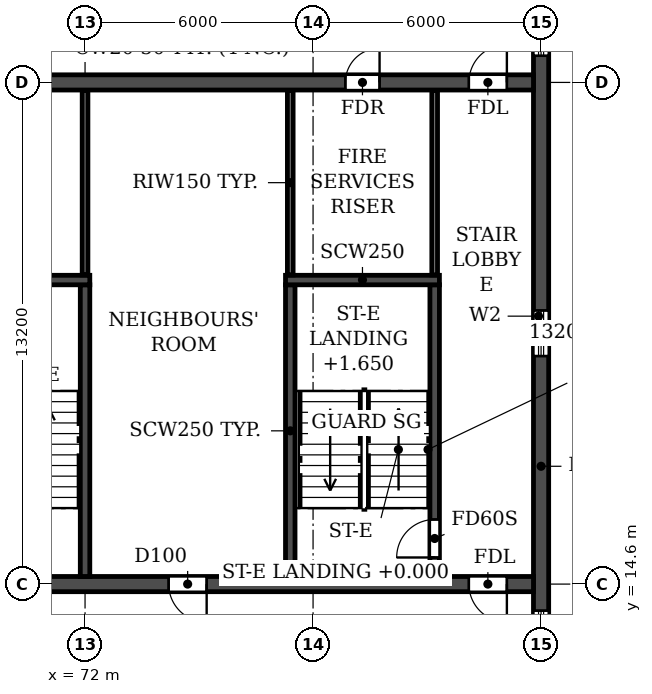
"""IFC4 building model, lengths in metres.
Left out: names, types, materials, properties, quantities, classifications, styles, units other than length and angle.
Written with IfcOpenShell. Run it as: python <this file> out.ifc"""

import sys

from ifc_helpers import new_model, si_unit, direction, frame, frame_2d, origin, place, context, subcontext, project, spatial, rectangle, extrude, element, fill, save


model = new_model("IFC4")
c1 = context("Model", 3, precision=1e-05, world=origin(), true_north=direction((0.0, 1.0)))
c2 = subcontext(c1, "Body", "Model", "MODEL_VIEW")
j1 = project(units=[si_unit("LENGTHUNIT", "METRE"), si_unit("PLANEANGLEUNIT", "RADIAN")], contexts=[c1])
p1 = place(None, origin())
s1 = spatial("IfcSite", under=j1, at=p1, CompositionType="ELEMENT")
p2 = place(p1, origin())
s2 = spatial("IfcBuilding", under=s1, at=p2, CompositionType="ELEMENT")
p3 = place(p2, frame((0.0, 0.0, 201.6)))
s3 = spatial("IfcBuildingStorey", under=s2, at=p3, CompositionType="ELEMENT", Elevation=201.6)
p4 = place(p3, frame((84.0, 4.683, 0.0), z_axis=(0.0, 0.0, 1.0), x_axis=(0.0, 1.0, 0.0)))
e1 = element("IfcWall", 1, at=p4, inside=s3, PredefinedType="SHEAR", context=c2, shape_type="SweptSolid", body=[
    extrude(rectangle(XDim=31.834, YDim=0.4, at=frame_2d((15.917, 0.0))), origin(), (0.0, 0.0, 1.0), 3.08),
])
p5 = place(p4, frame((23.817, 0.0, 0.9)))
e2 = element("IfcOpeningElement", 2, at=p5, cuts=e1, PredefinedType="OPENING", context=c2, shape_type="SweptSolid", body=[
    extrude(rectangle(XDim=1.2, YDim=1.5, at=frame_2d((0.6, 0.75))), frame((0.0, 0.21, 0.0), z_axis=(0.0, -1.0, 0.0), x_axis=(1.0, 0.0, 0.0)), (0.0, 0.0, 1.0), 0.42),
])
p6 = place(p4, frame((8.017, 0.0, 0.9)))
e3 = element("IfcOpeningElement", 3, at=p6, cuts=e1, PredefinedType="OPENING", context=c2, shape_type="SweptSolid", body=[
    extrude(rectangle(XDim=1.2, YDim=1.5, at=frame_2d((0.6, 0.75))), frame((0.0, 0.21, 0.0), z_axis=(0.0, -1.0, 0.0), x_axis=(1.0, 0.0, 0.0)), (0.0, 0.0, 1.0), 0.42),
])
p7 = place(p4, frame((27.694, 0.0, 0.6)))
e4 = element("IfcOpeningElement", 4, at=p7, cuts=e1, PredefinedType="OPENING", context=c2, shape_type="SweptSolid", body=[
    extrude(rectangle(XDim=2.2, YDim=1.8, at=frame_2d((1.1, 0.9))), frame((0.0, 0.21, 0.0), z_axis=(0.0, -1.0, 0.0), x_axis=(1.0, 0.0, 0.0)), (0.0, 0.0, 1.0), 0.42),
])
p8 = place(p4, frame((2.541, 0.0, 0.6)))
e5 = element("IfcOpeningElement", 5, at=p8, cuts=e1, PredefinedType="OPENING", context=c2, shape_type="SweptSolid", body=[
    extrude(rectangle(XDim=2.2, YDim=1.8, at=frame_2d((1.1, 0.9))), frame((0.0, 0.21, 0.0), z_axis=(0.0, -1.0, 0.0), x_axis=(1.0, 0.0, 0.0)), (0.0, 0.0, 1.0), 0.42),
])
p9 = place(p4, frame((15.917, 0.0, 0.9)))
e6 = element("IfcOpeningElement", 6, at=p9, cuts=e1, PredefinedType="OPENING", context=c2, shape_type="SweptSolid", body=[
    extrude(rectangle(XDim=1.2, YDim=1.5, at=frame_2d((0.6, 0.75))), frame((0.0, 0.21, 0.0), z_axis=(0.0, -1.0, 0.0), x_axis=(1.0, 0.0, 0.0)), (0.0, 0.0, 1.0), 0.42),
])
p10 = place(p3, frame((18.2, 14.6, 0.0), z_axis=(0.0, 0.0, 1.0), x_axis=(1.0, 0.0, 0.0)))
e7 = element("IfcWall", 7, at=p10, inside=s3, PredefinedType="SOLIDWALL", context=c2, shape_type="SweptSolid", body=[
    extrude(rectangle(XDim=65.6, YDim=0.4, at=frame_2d((32.8, 0.0))), origin(), (0.0, 0.0, 1.0), 3.08),
])
p11 = place(p10, frame((0.7, 0.0, 0.0)))
e8 = element("IfcOpeningElement", 8, at=p11, cuts=e7, PredefinedType="OPENING", context=c2, shape_type="SweptSolid", body=[
    extrude(rectangle(XDim=1.0, YDim=2.1, at=frame_2d((0.5, 1.05))), frame((0.0, 0.21, 0.0), z_axis=(0.0, -1.0, 0.0), x_axis=(1.0, 0.0, 0.0)), (0.0, 0.0, 1.0), 0.42),
])
p12 = place(p10, frame((8.6, 0.0, 0.0)))
e9 = element("IfcOpeningElement", 9, at=p12, cuts=e7, PredefinedType="OPENING", context=c2, shape_type="SweptSolid", body=[
    extrude(rectangle(XDim=1.0, YDim=2.1, at=frame_2d((0.5, 1.05))), frame((0.0, 0.21, 0.0), z_axis=(0.0, -1.0, 0.0), x_axis=(1.0, 0.0, 0.0)), (0.0, 0.0, 1.0), 0.42),
])
p13 = place(p10, frame((13.2, 0.0, 0.0)))
e10 = element("IfcOpeningElement", 10, at=p13, cuts=e7, PredefinedType="OPENING", context=c2, shape_type="SweptSolid", body=[
    extrude(rectangle(XDim=1.0, YDim=2.1, at=frame_2d((0.5, 1.05))), frame((0.0, 0.21, 0.0), z_axis=(0.0, -1.0, 0.0), x_axis=(1.0, 0.0, 0.0)), (0.0, 0.0, 1.0), 0.42),
])
p14 = place(p10, frame((27.1, 0.0, 0.0)))
e11 = element("IfcOpeningElement", 11, at=p14, cuts=e7, PredefinedType="OPENING", context=c2, shape_type="SweptSolid", body=[
    extrude(rectangle(XDim=1.0, YDim=2.1, at=frame_2d((0.5, 1.05))), frame((0.0, 0.21, 0.0), z_axis=(0.0, -1.0, 0.0), x_axis=(1.0, 0.0, 0.0)), (0.0, 0.0, 1.0), 0.42),
])
p15 = place(p10, frame((32.3, 0.0, 0.0)))
e12 = element("IfcOpeningElement", 12, at=p15, cuts=e7, PredefinedType="OPENING", context=c2, shape_type="SweptSolid", body=[
    extrude(rectangle(XDim=1.0, YDim=2.1, at=frame_2d((0.5, 1.05))), frame((0.0, 0.21, 0.0), z_axis=(0.0, -1.0, 0.0), x_axis=(1.0, 0.0, 0.0)), (0.0, 0.0, 1.0), 0.42),
])
p16 = place(p10, frame((34.9, 0.0, 0.0)))
e13 = element("IfcOpeningElement", 13, at=p16, cuts=e7, PredefinedType="OPENING", context=c2, shape_type="SweptSolid", body=[
    extrude(rectangle(XDim=1.0, YDim=2.1, at=frame_2d((0.5, 1.05))), frame((0.0, 0.21, 0.0), z_axis=(0.0, -1.0, 0.0), x_axis=(1.0, 0.0, 0.0)), (0.0, 0.0, 1.0), 0.42),
])
p17 = place(p10, frame((38.8, 0.0, 0.0)))
e14 = element("IfcOpeningElement", 14, at=p17, cuts=e7, PredefinedType="OPENING", context=c2, shape_type="SweptSolid", body=[
    extrude(rectangle(XDim=1.0, YDim=2.1, at=frame_2d((0.5, 1.05))), frame((0.0, 0.21, 0.0), z_axis=(0.0, -1.0, 0.0), x_axis=(1.0, 0.0, 0.0)), (0.0, 0.0, 1.0), 0.42),
])
p18 = place(p10, frame((51.4, 0.0, 0.0)))
e15 = element("IfcOpeningElement", 15, at=p18, cuts=e7, PredefinedType="OPENING", context=c2, shape_type="SweptSolid", body=[
    extrude(rectangle(XDim=1.0, YDim=2.1, at=frame_2d((0.5, 1.05))), frame((0.0, 0.21, 0.0), z_axis=(0.0, -1.0, 0.0), x_axis=(1.0, 0.0, 0.0)), (0.0, 0.0, 1.0), 0.42),
])
p19 = place(p10, frame((56.0, 0.0, 0.0)))
e16 = element("IfcOpeningElement", 16, at=p19, cuts=e7, PredefinedType="OPENING", context=c2, shape_type="SweptSolid", body=[
    extrude(rectangle(XDim=1.0, YDim=2.1, at=frame_2d((0.5, 1.05))), frame((0.0, 0.21, 0.0), z_axis=(0.0, -1.0, 0.0), x_axis=(1.0, 0.0, 0.0)), (0.0, 0.0, 1.0), 0.42),
])
p20 = place(p10, frame((63.9, 0.0, 0.0)))
e17 = element("IfcOpeningElement", 17, at=p20, cuts=e7, PredefinedType="OPENING", context=c2, shape_type="SweptSolid", body=[
    extrude(rectangle(XDim=1.0, YDim=2.1, at=frame_2d((0.5, 1.05))), frame((0.0, 0.21, 0.0), z_axis=(0.0, -1.0, 0.0), x_axis=(1.0, 0.0, 0.0)), (0.0, 0.0, 1.0), 0.42),
])
p21 = place(p3, frame((18.2, 27.8, 0.0), z_axis=(0.0, 0.0, 1.0), x_axis=(1.0, 0.0, 0.0)))
e18 = element("IfcWall", 18, at=p21, inside=s3, PredefinedType="SOLIDWALL", context=c2, shape_type="SweptSolid", body=[
    extrude(rectangle(XDim=65.6, YDim=0.4, at=frame_2d((32.8, 0.0))), origin(), (0.0, 0.0, 1.0), 3.08),
])
p22 = place(p21, frame((0.7, 0.0, 0.0)))
e19 = element("IfcOpeningElement", 19, at=p22, cuts=e18, PredefinedType="OPENING", context=c2, shape_type="SweptSolid", body=[
    extrude(rectangle(XDim=1.0, YDim=2.1, at=frame_2d((0.5, 1.05))), frame((0.0, 0.21, 0.0), z_axis=(0.0, -1.0, 0.0), x_axis=(1.0, 0.0, 0.0)), (0.0, 0.0, 1.0), 0.42),
])
p23 = place(p21, frame((4.05, 0.0, 0.0)))
e20 = element("IfcOpeningElement", 20, at=p23, cuts=e18, PredefinedType="OPENING", context=c2, shape_type="SweptSolid", body=[
    extrude(rectangle(XDim=0.9, YDim=2.1, at=frame_2d((0.45, 1.05))), frame((0.0, 0.21, 0.0), z_axis=(0.0, -1.0, 0.0), x_axis=(1.0, 0.0, 0.0)), (0.0, 0.0, 1.0), 0.42),
])
p24 = place(p21, frame((13.25, 0.0, 0.0)))
e21 = element("IfcOpeningElement", 21, at=p24, cuts=e18, PredefinedType="OPENING", context=c2, shape_type="SweptSolid", body=[
    extrude(rectangle(XDim=0.9, YDim=2.1, at=frame_2d((0.45, 1.05))), frame((0.0, 0.21, 0.0), z_axis=(0.0, -1.0, 0.0), x_axis=(1.0, 0.0, 0.0)), (0.0, 0.0, 1.0), 0.42),
])
p25 = place(p21, frame((17.7, 0.0, 0.0)))
e22 = element("IfcOpeningElement", 22, at=p25, cuts=e18, PredefinedType="OPENING", context=c2, shape_type="SweptSolid", body=[
    extrude(rectangle(XDim=1.0, YDim=2.1, at=frame_2d((0.5, 1.05))), frame((0.0, 0.21, 0.0), z_axis=(0.0, -1.0, 0.0), x_axis=(1.0, 0.0, 0.0)), (0.0, 0.0, 1.0), 0.42),
])
p26 = place(p21, frame((22.9, 0.0, 0.0)))
e23 = element("IfcOpeningElement", 23, at=p26, cuts=e18, PredefinedType="OPENING", context=c2, shape_type="SweptSolid", body=[
    extrude(rectangle(XDim=1.0, YDim=2.1, at=frame_2d((0.5, 1.05))), frame((0.0, 0.21, 0.0), z_axis=(0.0, -1.0, 0.0), x_axis=(1.0, 0.0, 0.0)), (0.0, 0.0, 1.0), 0.42),
])
p27 = place(p21, frame((29.4, 0.0, 0.0)))
e24 = element("IfcOpeningElement", 24, at=p27, cuts=e18, PredefinedType="OPENING", context=c2, shape_type="SweptSolid", body=[
    extrude(rectangle(XDim=1.0, YDim=2.1, at=frame_2d((0.5, 1.05))), frame((0.0, 0.21, 0.0), z_axis=(0.0, -1.0, 0.0), x_axis=(1.0, 0.0, 0.0)), (0.0, 0.0, 1.0), 0.42),
])
p28 = place(p21, frame((32.3, 0.0, 0.0)))
e25 = element("IfcOpeningElement", 25, at=p28, cuts=e18, PredefinedType="OPENING", context=c2, shape_type="SweptSolid", body=[
    extrude(rectangle(XDim=1.0, YDim=2.1, at=frame_2d((0.5, 1.05))), frame((0.0, 0.21, 0.0), z_axis=(0.0, -1.0, 0.0), x_axis=(1.0, 0.0, 0.0)), (0.0, 0.0, 1.0), 0.42),
])
p29 = place(p21, frame((35.2, 0.0, 0.0)))
e26 = element("IfcOpeningElement", 26, at=p29, cuts=e18, PredefinedType="OPENING", context=c2, shape_type="SweptSolid", body=[
    extrude(rectangle(XDim=1.0, YDim=2.1, at=frame_2d((0.5, 1.05))), frame((0.0, 0.21, 0.0), z_axis=(0.0, -1.0, 0.0), x_axis=(1.0, 0.0, 0.0)), (0.0, 0.0, 1.0), 0.42),
])
p30 = place(p21, frame((37.8, 0.0, 0.0)))
e27 = element("IfcOpeningElement", 27, at=p30, cuts=e18, PredefinedType="OPENING", context=c2, shape_type="SweptSolid", body=[
    extrude(rectangle(XDim=1.0, YDim=2.1, at=frame_2d((0.5, 1.05))), frame((0.0, 0.21, 0.0), z_axis=(0.0, -1.0, 0.0), x_axis=(1.0, 0.0, 0.0)), (0.0, 0.0, 1.0), 0.42),
])
p31 = place(p21, frame((40.4, 0.0, 0.0)))
e28 = element("IfcOpeningElement", 28, at=p31, cuts=e18, PredefinedType="OPENING", context=c2, shape_type="SweptSolid", body=[
    extrude(rectangle(XDim=1.0, YDim=2.1, at=frame_2d((0.5, 1.05))), frame((0.0, 0.21, 0.0), z_axis=(0.0, -1.0, 0.0), x_axis=(1.0, 0.0, 0.0)), (0.0, 0.0, 1.0), 0.42),
])
p32 = place(p21, frame((43.0, 0.0, 0.0)))
e29 = element("IfcOpeningElement", 29, at=p32, cuts=e18, PredefinedType="OPENING", context=c2, shape_type="SweptSolid", body=[
    extrude(rectangle(XDim=1.0, YDim=2.1, at=frame_2d((0.5, 1.05))), frame((0.0, 0.21, 0.0), z_axis=(0.0, -1.0, 0.0), x_axis=(1.0, 0.0, 0.0)), (0.0, 0.0, 1.0), 0.42),
])
p33 = place(p21, frame((46.9, 0.0, 0.0)))
e30 = element("IfcOpeningElement", 30, at=p33, cuts=e18, PredefinedType="OPENING", context=c2, shape_type="SweptSolid", body=[
    extrude(rectangle(XDim=1.0, YDim=2.1, at=frame_2d((0.5, 1.05))), frame((0.0, 0.21, 0.0), z_axis=(0.0, -1.0, 0.0), x_axis=(1.0, 0.0, 0.0)), (0.0, 0.0, 1.0), 0.42),
])
p34 = place(p21, frame((51.45, 0.0, 0.0)))
e31 = element("IfcOpeningElement", 31, at=p34, cuts=e18, PredefinedType="OPENING", context=c2, shape_type="SweptSolid", body=[
    extrude(rectangle(XDim=0.9, YDim=2.1, at=frame_2d((0.45, 1.05))), frame((0.0, 0.21, 0.0), z_axis=(0.0, -1.0, 0.0), x_axis=(1.0, 0.0, 0.0)), (0.0, 0.0, 1.0), 0.42),
])
p35 = place(p21, frame((60.65, 0.0, 0.0)))
e32 = element("IfcOpeningElement", 32, at=p35, cuts=e18, PredefinedType="OPENING", context=c2, shape_type="SweptSolid", body=[
    extrude(rectangle(XDim=0.9, YDim=2.1, at=frame_2d((0.45, 1.05))), frame((0.0, 0.21, 0.0), z_axis=(0.0, -1.0, 0.0), x_axis=(1.0, 0.0, 0.0)), (0.0, 0.0, 1.0), 0.42),
])
p36 = place(p21, frame((63.9, 0.0, 0.0)))
e33 = element("IfcOpeningElement", 33, at=p36, cuts=e18, PredefinedType="OPENING", context=c2, shape_type="SweptSolid", body=[
    extrude(rectangle(XDim=1.0, YDim=2.1, at=frame_2d((0.5, 1.05))), frame((0.0, 0.21, 0.0), z_axis=(0.0, -1.0, 0.0), x_axis=(1.0, 0.0, 0.0)), (0.0, 0.0, 1.0), 0.42),
])
p37 = place(p3, frame((72.0, 14.8, 0.0), z_axis=(0.0, 0.0, 1.0), x_axis=(0.0, 1.0, 0.0)))
e34 = element("IfcWall", 34, at=p37, inside=s3, PredefinedType="SOLIDWALL", context=c2, shape_type="SweptSolid", body=[
    extrude(rectangle(XDim=7.675, YDim=0.25, at=frame_2d((3.837, 0.0))), origin(), (0.0, 0.0, 1.0), 3.08),
])
p38 = place(p3, frame((68.075, 22.6, 0.0), z_axis=(0.0, 0.0, 1.0), x_axis=(1.0, 0.0, 0.0)))
e35 = element("IfcWall", 35, at=p38, inside=s3, PredefinedType="SOLIDWALL", context=c2, shape_type="SweptSolid", body=[
    extrude(rectangle(XDim=4.05, YDim=0.25, at=frame_2d((2.025, 0.0))), origin(), (0.0, 0.0, 1.0), 3.08),
])
p39 = place(p3, frame((77.4, 14.8, 0.0), z_axis=(0.0, 0.0, 1.0), x_axis=(0.0, 1.0, 0.0)))
e36 = element("IfcWall", 36, at=p39, inside=s3, PredefinedType="SOLIDWALL", context=c2, shape_type="SweptSolid", body=[
    extrude(rectangle(XDim=7.675, YDim=0.25, at=frame_2d((3.837, 0.0))), origin(), (0.0, 0.0, 1.0), 3.08),
])
p40 = place(p3, frame((81.2, 14.8, 0.0), z_axis=(0.0, 0.0, 1.0), x_axis=(0.0, 1.0, 0.0)))
e37 = element("IfcWall", 37, at=p40, inside=s3, PredefinedType="SOLIDWALL", context=c2, shape_type="SweptSolid", body=[
    extrude(rectangle(XDim=7.675, YDim=0.25, at=frame_2d((3.837, 0.0))), origin(), (0.0, 0.0, 1.0), 3.08),
])
p41 = place(p40, frame((0.5, 0.0, 0.0)))
e38 = element("IfcOpeningElement", 38, at=p41, cuts=e37, PredefinedType="OPENING", context=c2, shape_type="SweptSolid", body=[
    extrude(rectangle(XDim=1.0, YDim=2.1, at=frame_2d((0.5, 1.05))), frame((0.0, 0.135, 0.0), z_axis=(0.0, -1.0, 0.0), x_axis=(1.0, 0.0, 0.0)), (0.0, 0.0, 1.0), 0.27),
])
p42 = place(p3, frame((77.275, 22.6, 0.0), z_axis=(0.0, 0.0, 1.0), x_axis=(1.0, 0.0, 0.0)))
e39 = element("IfcWall", 39, at=p42, inside=s3, PredefinedType="SOLIDWALL", context=c2, shape_type="SweptSolid", body=[
    extrude(rectangle(XDim=4.05, YDim=0.25, at=frame_2d((2.025, 0.0))), origin(), (0.0, 0.0, 1.0), 3.08),
])
for number, where, z_axis, x_axis in (
    (40, (72.0, 22.735, 0.0), (0.0, 0.0, 1.0), (0.0, 1.0, 0.0)),
    (41, (77.4, 22.735, 0.0), (0.0, 0.0, 1.0), (0.0, 1.0, 0.0)),
    (42, (81.2, 22.735, 0.0), (0.0, 0.0, 1.0), (0.0, 1.0, 0.0)),
):
    element("IfcWall", number, at=place(p3, frame(where, z_axis=z_axis, x_axis=x_axis)), inside=s3, PredefinedType="PARTITIONING", context=c2, shape_type="SweptSolid", body=[
        extrude(rectangle(XDim=4.855, YDim=0.15, at=frame_2d((2.427, 0.0))), origin(), (0.0, 0.0, 1.0), 3.08),
    ])
p43 = place(p5, origin())
e43 = element("IfcWindow", 43, at=p43, inside=s3, PartitioningType="SINGLE_PANEL", PredefinedType="WINDOW", context=c2, shape_type="SweptSolid", body=[
    extrude(rectangle(XDim=1.2, YDim=1.5, at=frame_2d((0.6, 0.75))), frame((0.0, 0.03, 0.0), z_axis=(0.0, -1.0, 0.0), x_axis=(1.0, 0.0, 0.0)), (0.0, 0.0, 1.0), 0.06),
])
fill(e2, e43)
p44 = place(p6, origin())
e44 = element("IfcWindow", 44, at=p44, inside=s3, PartitioningType="SINGLE_PANEL", PredefinedType="WINDOW", context=c2, shape_type="SweptSolid", body=[
    extrude(rectangle(XDim=1.2, YDim=1.5, at=frame_2d((0.6, 0.75))), frame((0.0, 0.03, 0.0), z_axis=(0.0, -1.0, 0.0), x_axis=(1.0, 0.0, 0.0)), (0.0, 0.0, 1.0), 0.06),
])
fill(e3, e44)
p45 = place(p9, origin())
e45 = element("IfcWindow", 45, at=p45, inside=s3, PartitioningType="SINGLE_PANEL", PredefinedType="WINDOW", context=c2, shape_type="SweptSolid", body=[
    extrude(rectangle(XDim=1.2, YDim=1.5, at=frame_2d((0.6, 0.75))), frame((0.0, 0.03, 0.0), z_axis=(0.0, -1.0, 0.0), x_axis=(1.0, 0.0, 0.0)), (0.0, 0.0, 1.0), 0.06),
])
fill(e6, e45)
p46 = place(p35, origin())
e46 = element("IfcDoor", 46, at=p46, inside=s3, OperationType="SINGLE_SWING_RIGHT", PredefinedType="DOOR", context=c2, shape_type="SweptSolid", body=[
    extrude(rectangle(XDim=0.9, YDim=2.1, at=frame_2d((0.45, 1.05))), frame((0.0, 0.025, 0.0), z_axis=(0.0, -1.0, 0.0), x_axis=(1.0, 0.0, 0.0)), (0.0, 0.0, 1.0), 0.05),
])
fill(e32, e46)
p47 = place(p36, origin())
e47 = element("IfcDoor", 47, at=p47, inside=s3, OperationType="SINGLE_SWING_RIGHT", PredefinedType="DOOR", context=c2, shape_type="SweptSolid", body=[
    extrude(rectangle(XDim=1.0, YDim=2.1, at=frame_2d((0.5, 1.05))), frame((0.0, 0.025, 0.0), z_axis=(0.0, -1.0, 0.0), x_axis=(1.0, 0.0, 0.0)), (0.0, 0.0, 1.0), 0.05),
])
fill(e33, e47)
p48 = place(p19, frame((1.0, 0.0, 0.0), z_axis=(0.0, 0.0, 1.0), x_axis=(-1.0, 0.0, 0.0)))
e48 = element("IfcDoor", 48, at=p48, inside=s3, OperationType="SINGLE_SWING_LEFT", PredefinedType="DOOR", context=c2, shape_type="SweptSolid", body=[
    extrude(rectangle(XDim=1.0, YDim=2.1, at=frame_2d((0.5, 1.05))), frame((0.0, 0.025, 0.0), z_axis=(0.0, -1.0, 0.0), x_axis=(1.0, 0.0, 0.0)), (0.0, 0.0, 1.0), 0.05),
])
fill(e16, e48)
p49 = place(p20, frame((1.0, 0.0, 0.0), z_axis=(0.0, 0.0, 1.0), x_axis=(-1.0, 0.0, 0.0)))
e49 = element("IfcDoor", 49, at=p49, inside=s3, OperationType="SINGLE_SWING_LEFT", PredefinedType="DOOR", context=c2, shape_type="SweptSolid", body=[
    extrude(rectangle(XDim=1.0, YDim=2.1, at=frame_2d((0.5, 1.05))), frame((0.0, 0.025, 0.0), z_axis=(0.0, -1.0, 0.0), x_axis=(1.0, 0.0, 0.0)), (0.0, 0.0, 1.0), 0.05),
])
fill(e17, e49)
p50 = place(p41, origin())
e50 = element("IfcDoor", 50, at=p50, inside=s3, OperationType="SINGLE_SWING_LEFT", PredefinedType="DOOR", context=c2, shape_type="SweptSolid", body=[
    extrude(rectangle(XDim=1.0, YDim=2.1, at=frame_2d((0.5, 1.05))), frame((0.0, 0.025, 0.0), z_axis=(0.0, -1.0, 0.0), x_axis=(1.0, 0.0, 0.0)), (0.0, 0.0, 1.0), 0.05),
])
fill(e38, e50)
save(model, sys.argv[1])
